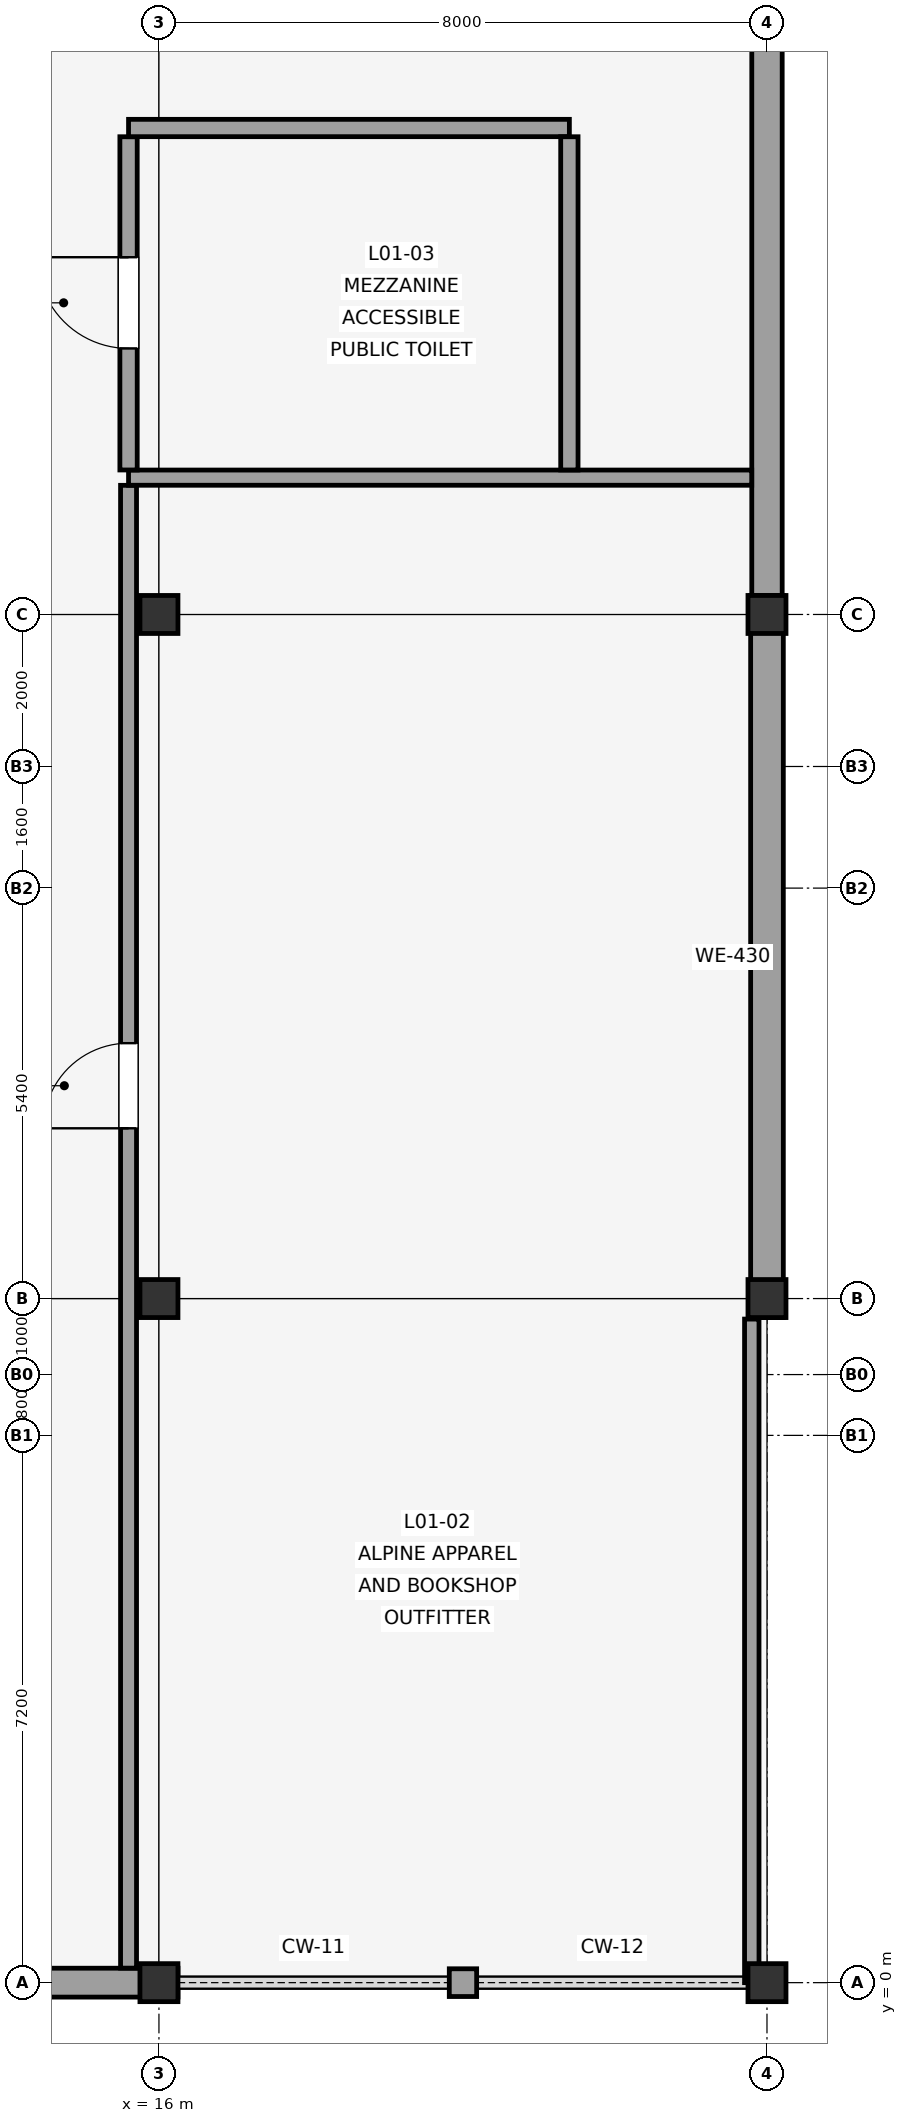
"""IFC4 building model, lengths in metres.
Left out: names, types, materials, properties, quantities, classifications, styles, units other than length and angle.
Written with IfcOpenShell. Run it as: python <this file> out.ifc"""

import sys

from ifc_helpers import new_model, si_unit, direction, frame, frame_2d, origin, origin_2d, place, context, subcontext, project, spatial, rectangle, extrude, element, fill, save


model = new_model("IFC4")
c1 = context("Model", 3, precision=1e-05, world=origin(), true_north=direction((0.0, 1.0)))
c2 = subcontext(c1, "Body", "Model", "MODEL_VIEW")
j1 = project(units=[si_unit("LENGTHUNIT", "METRE"), si_unit("PLANEANGLEUNIT", "RADIAN")], contexts=[c1])
p1 = place(None, origin())
s1 = spatial("IfcSite", under=j1, at=p1, CompositionType="ELEMENT")
p2 = place(p1, origin())
s2 = spatial("IfcBuilding", under=s1, at=p2, CompositionType="ELEMENT")
p3 = place(p2, frame((0.0, 0.0, 4.5)))
s3 = spatial("IfcBuildingStorey", under=s2, at=p3, CompositionType="ELEMENT", Elevation=4.5)
for number, where, z_axis, x_axis in (
    (1, (16.0, 0.0, 0.0), (0.0, 0.0, 1.0), (1.0, 0.0, 0.0)),
    (2, (16.0, 9.0, 0.0), (0.0, 0.0, 1.0), (1.0, 0.0, 0.0)),
    (3, (16.0, 18.0, 0.0), (0.0, 0.0, 1.0), (1.0, 0.0, 0.0)),
    (4, (24.0, 0.0, 0.0), (0.0, 0.0, 1.0), (1.0, 0.0, 0.0)),
    (5, (24.0, 9.0, 0.0), (0.0, 0.0, 1.0), (1.0, 0.0, 0.0)),
    (6, (24.0, 18.0, 0.0), (0.0, 0.0, 1.0), (1.0, 0.0, 0.0)),
):
    element("IfcColumn", number, at=place(p3, frame(where, z_axis=z_axis, x_axis=x_axis)), inside=s3, PredefinedType="COLUMN", context=c2, shape_type="SweptSolid", body=[
        extrude(rectangle(XDim=0.5, YDim=0.5, at=origin_2d()), origin(), (0.0, 0.0, 1.0), 4.5),
    ])
p4 = place(p3, frame((7.75, 0.0, 0.0), z_axis=(0.0, 0.0, 1.0), x_axis=(1.0, 0.0, 0.0)))
e7 = element("IfcWall", 7, at=p4, inside=s3, PredefinedType="SOLIDWALL", context=c2, shape_type="SweptSolid", body=[
    extrude(rectangle(XDim=8.5, YDim=0.38, at=frame_2d((4.25, 0.0))), origin(), (0.0, 0.0, 1.0), 3.12),
])
p5 = place(p3, frame((19.82, 0.0, 0.0), z_axis=(0.0, 0.0, 1.0), x_axis=(1.0, 0.0, 0.0)))
e8 = element("IfcWall", 8, at=p5, inside=s3, PredefinedType="SOLIDWALL", context=c2, shape_type="SweptSolid", body=[
    extrude(rectangle(XDim=0.36, YDim=0.365, at=frame_2d((0.18, 0.0))), origin(), (0.0, 0.0, 1.0), 3.12),
])
p6 = place(p3, frame((24.0, 8.75, 0.0), z_axis=(0.0, 0.0, 1.0), x_axis=(0.0, 1.0, 0.0)))
e9 = element("IfcWall", 9, at=p6, inside=s3, PredefinedType="SOLIDWALL", context=c2, shape_type="SweptSolid", body=[
    extrude(rectangle(XDim=9.5, YDim=0.43, at=frame_2d((4.75, 0.0))), origin(), (0.0, 0.0, 1.0), 3.12),
])
p7 = place(p3, frame((24.0, 18.251, 0.0), z_axis=(0.0, 0.0, 1.0), x_axis=(0.0, 1.0, 0.0)))
e10 = element("IfcWall", 10, at=p7, inside=s3, PredefinedType="SOLIDWALL", context=c2, shape_type="SweptSolid", body=[
    extrude(rectangle(XDim=8.999, YDim=0.4, at=frame_2d((4.5, 0.0))), origin(), (0.0, 0.0, 1.0), 3.12),
])
p8 = place(p3, frame((15.6, 0.191, 0.0), z_axis=(0.0, 0.0, 1.0), x_axis=(0.0, 1.0, 0.0)))
e11 = element("IfcWall", 11, at=p8, inside=s3, PredefinedType="PARTITIONING", context=c2, shape_type="SweptSolid", body=[
    extrude(rectangle(XDim=19.508, YDim=0.21, at=frame_2d((9.754, 0.0))), origin(), (0.0, 0.0, 1.0), 2.7),
])
p9 = place(p8, frame((11.049, 0.0, 0.0)))
e12 = element("IfcOpeningElement", 12, at=p9, cuts=e11, PredefinedType="OPENING", context=c2, shape_type="SweptSolid", body=[
    extrude(rectangle(XDim=1.12, YDim=2.18, at=frame_2d((0.56, 1.09))), frame((0.0, 0.115, 0.0), z_axis=(0.0, -1.0, 0.0), x_axis=(1.0, 0.0, 0.0)), (0.0, 0.0, 1.0), 0.23),
])
p10 = place(p3, frame((15.6, 19.8, 0.0), z_axis=(0.0, 0.0, 1.0), x_axis=(1.0, 0.0, 0.0)))
e13 = element("IfcWall", 13, at=p10, inside=s3, PredefinedType="PARTITIONING", context=c2, shape_type="SweptSolid", body=[
    extrude(rectangle(XDim=8.199, YDim=0.2, at=frame_2d((4.1, 0.0))), origin(), (0.0, 0.0, 1.0), 2.7),
])
p11 = place(p3, frame((23.8, 8.73, 0.0), z_axis=(0.0, 0.0, 1.0), x_axis=(0.0, -1.0, 0.0)))
e14 = element("IfcWall", 14, at=p11, inside=s3, PredefinedType="PARTITIONING", context=c2, shape_type="SweptSolid", body=[
    extrude(rectangle(XDim=8.73, YDim=0.19, at=frame_2d((4.365, 0.0))), origin(), (0.0, 0.0, 1.0), 2.7),
])
p12 = place(p3, frame((15.6, 19.901, 0.0), z_axis=(0.0, 0.0, 1.0), x_axis=(0.0, 1.0, 0.0)))
e15 = element("IfcWall", 15, at=p12, inside=s3, PredefinedType="PLUMBINGWALL", context=c2, shape_type="SweptSolid", body=[
    extrude(rectangle(XDim=4.384, YDim=0.228, at=frame_2d((2.192, 0.0))), origin(), (0.0, 0.0, 1.0), 2.7),
])
p13 = place(p12, frame((1.599, 0.0, 0.0)))
e16 = element("IfcOpeningElement", 16, at=p13, cuts=e15, PredefinedType="OPENING", context=c2, shape_type="SweptSolid", body=[
    extrude(rectangle(XDim=1.2, YDim=2.18, at=frame_2d((0.6, 1.09))), frame((0.0, 0.124, 0.0), z_axis=(0.0, -1.0, 0.0), x_axis=(1.0, 0.0, 0.0)), (0.0, 0.0, 1.0), 0.248),
])
p14 = place(p3, frame((15.6, 24.4, 0.0), z_axis=(0.0, 0.0, 1.0), x_axis=(1.0, 0.0, 0.0)))
e17 = element("IfcWall", 17, at=p14, inside=s3, PredefinedType="PLUMBINGWALL", context=c2, shape_type="SweptSolid", body=[
    extrude(rectangle(XDim=5.8, YDim=0.228, at=frame_2d((2.9, 0.0))), origin(), (0.0, 0.0, 1.0), 2.7),
])
p15 = place(p3, frame((21.4, 24.285, 0.0), z_axis=(0.0, 0.0, 1.0), x_axis=(0.0, -1.0, 0.0)))
e18 = element("IfcWall", 18, at=p15, inside=s3, PredefinedType="PLUMBINGWALL", context=c2, shape_type="SweptSolid", body=[
    extrude(rectangle(XDim=4.384, YDim=0.228, at=frame_2d((2.192, 0.0))), origin(), (0.0, 0.0, 1.0), 2.7),
])
p16 = place(p9, origin())
e19 = element("IfcDoor", 19, at=p16, inside=s3, OperationType="SINGLE_SWING_LEFT", PredefinedType="DOOR", context=c2, shape_type="SweptSolid", body=[
    extrude(rectangle(XDim=1.12, YDim=2.18, at=frame_2d((0.56, 1.09))), frame((0.0, 0.025, 0.0), z_axis=(0.0, -1.0, 0.0), x_axis=(1.0, 0.0, 0.0)), (0.0, 0.0, 1.0), 0.05),
])
fill(e12, e19)
p17 = place(p13, origin())
e20 = element("IfcDoor", 20, at=p17, inside=s3, OperationType="SINGLE_SWING_RIGHT", PredefinedType="DOOR", context=c2, shape_type="SweptSolid", body=[
    extrude(rectangle(XDim=1.2, YDim=2.18, at=frame_2d((0.6, 1.09))), frame((0.0, 0.025, 0.0), z_axis=(0.0, -1.0, 0.0), x_axis=(1.0, 0.0, 0.0)), (0.0, 0.0, 1.0), 0.05),
])
fill(e16, e20)
save(model, sys.argv[1])
